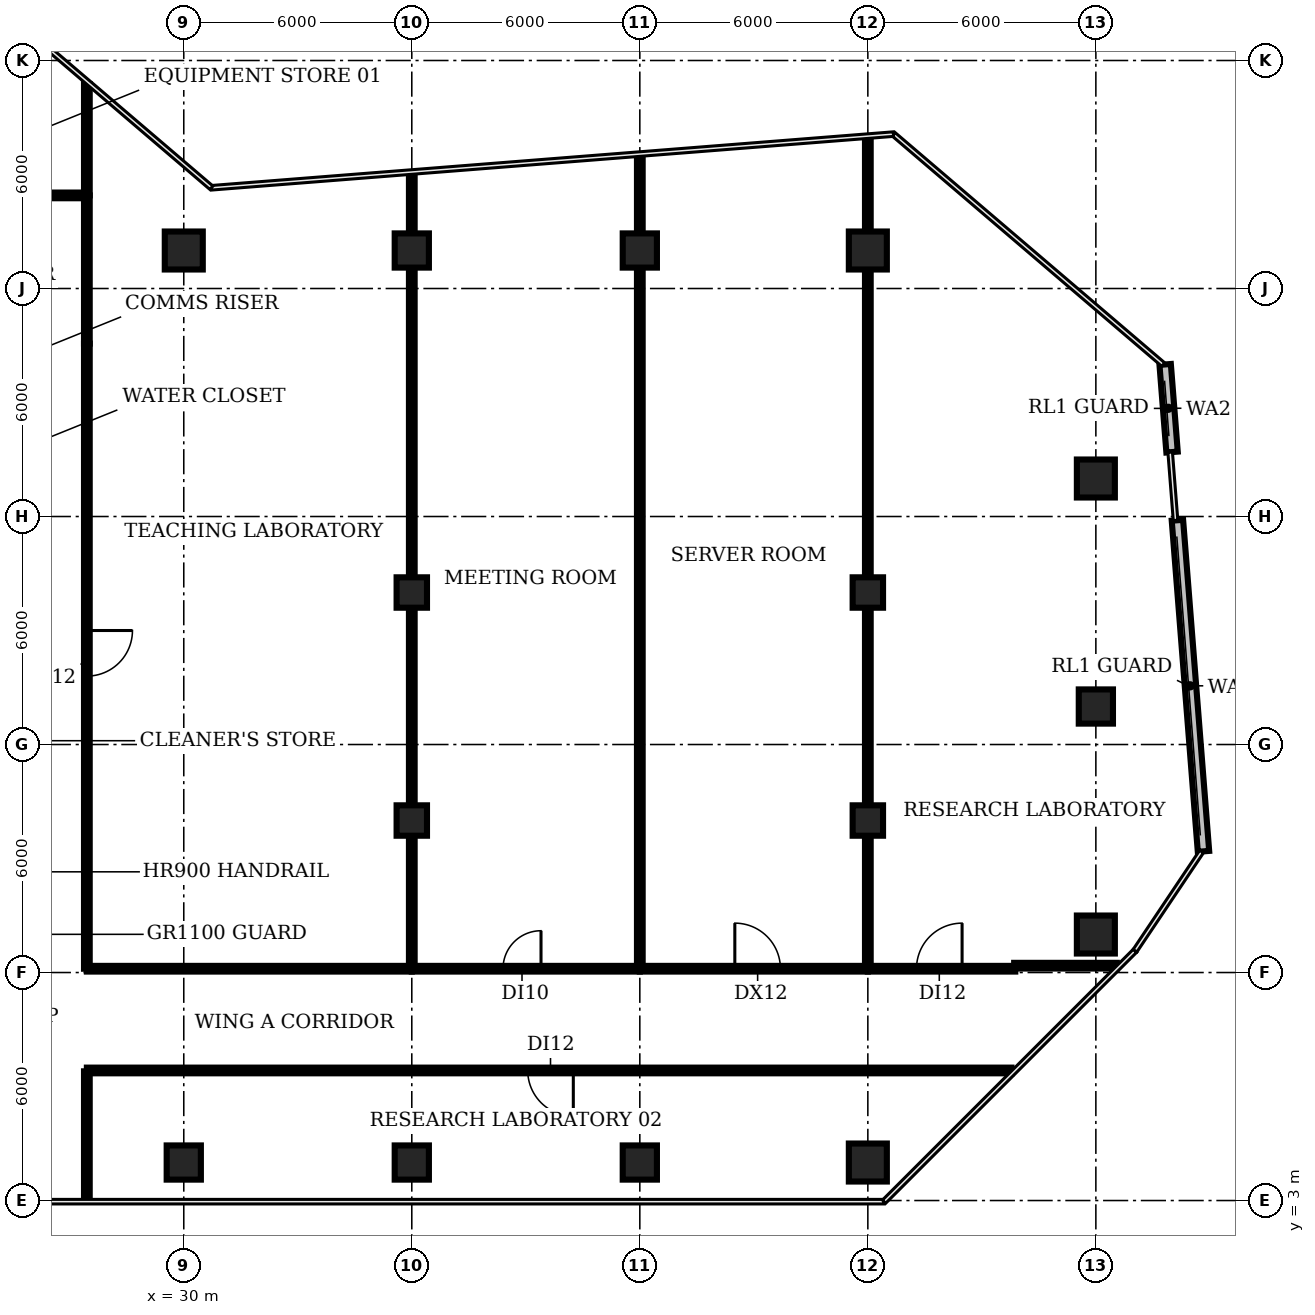
"""IFC4 building model, lengths in metres.
Left out: names, types, materials, properties, quantities, classifications, styles, units other than length and angle.
Written with IfcOpenShell. Run it as: python <this file> out.ifc"""

import sys

from ifc_helpers import new_model, si_unit, direction, frame, frame_2d, origin, origin_2d, place, context, subcontext, project, spatial, rectangle, circle, extrude, element, fill, save


model = new_model("IFC4")
c1 = context("Model", 3, precision=1e-05, world=origin(), true_north=direction((0.0, 1.0)))
c2 = subcontext(c1, "Body", "Model", "MODEL_VIEW")
j1 = project(units=[si_unit("LENGTHUNIT", "METRE"), si_unit("PLANEANGLEUNIT", "RADIAN")], contexts=[c1])
p1 = place(None, origin())
s1 = spatial("IfcSite", under=j1, at=p1, CompositionType="ELEMENT")
p2 = place(p1, origin())
s2 = spatial("IfcBuilding", under=s1, at=p2, CompositionType="ELEMENT")
p3 = place(p2, frame((0.0, 0.0, 92.0)))
s3 = spatial("IfcBuildingStorey", under=s2, at=p3, CompositionType="ELEMENT", Elevation=92.0)
p4 = place(p3, frame((30.0, 4.0, 0.0), z_axis=(0.0, 0.0, 1.0), x_axis=(1.0, 0.0, 0.0)))
e1 = element("IfcColumn", 1, at=p4, inside=s3, PredefinedType="COLUMN", context=c2, shape_type="SweptSolid", body=[
    extrude(rectangle(XDim=0.9, YDim=0.9, at=origin_2d()), origin(), (0.0, 0.0, 1.0), 3.85),
])
p5 = place(p3, frame((30.0, 28.0, 0.0), z_axis=(0.0, 0.0, 1.0), x_axis=(1.0, 0.0, 0.0)))
e2 = element("IfcColumn", 2, at=p5, inside=s3, PredefinedType="COLUMN", context=c2, shape_type="SweptSolid", body=[
    extrude(circle(Radius=0.5, at=origin_2d()), origin(), (0.0, 0.0, 1.0), 3.85),
])
p6 = place(p3, frame((36.0, 4.0, 0.0), z_axis=(0.0, 0.0, 1.0), x_axis=(1.0, 0.0, 0.0)))
e3 = element("IfcColumn", 3, at=p6, inside=s3, PredefinedType="COLUMN", context=c2, shape_type="SweptSolid", body=[
    extrude(rectangle(XDim=0.9, YDim=0.9, at=origin_2d()), origin(), (0.0, 0.0, 1.0), 3.85),
])
for number, where, z_axis, x_axis in (
    (4, (36.0, 13.0, 0.0), (0.0, 0.0, 1.0), (1.0, 0.0, 0.0)),
    (5, (36.0, 19.0, 0.0), (0.0, 0.0, 1.0), (1.0, 0.0, 0.0)),
):
    element("IfcColumn", number, at=place(p3, frame(where, z_axis=z_axis, x_axis=x_axis)), inside=s3, PredefinedType="COLUMN", context=c2, shape_type="SweptSolid", body=[
        extrude(rectangle(XDim=0.8, YDim=0.8, at=origin_2d()), origin(), (0.0, 0.0, 1.0), 3.85),
    ])
for number, where, z_axis, x_axis in (
    (6, (36.0, 28.0, 0.0), (0.0, 0.0, 1.0), (1.0, 0.0, 0.0)),
    (7, (42.0, 4.0, 0.0), (0.0, 0.0, 1.0), (1.0, 0.0, 0.0)),
    (8, (42.0, 28.0, 0.0), (0.0, 0.0, 1.0), (1.0, 0.0, 0.0)),
):
    element("IfcColumn", number, at=place(p3, frame(where, z_axis=z_axis, x_axis=x_axis)), inside=s3, PredefinedType="COLUMN", context=c2, shape_type="SweptSolid", body=[
        extrude(rectangle(XDim=0.9, YDim=0.9, at=origin_2d()), origin(), (0.0, 0.0, 1.0), 3.85),
    ])
p7 = place(p3, frame((48.0, 4.0, 0.0), z_axis=(0.0, 0.0, 1.0), x_axis=(1.0, 0.0, 0.0)))
e9 = element("IfcColumn", 9, at=p7, inside=s3, PredefinedType="COLUMN", context=c2, shape_type="SweptSolid", body=[
    extrude(circle(Radius=0.5, at=origin_2d()), origin(), (0.0, 0.0, 1.0), 3.85),
])
for number, where, z_axis, x_axis in (
    (10, (48.0, 13.0, 0.0), (0.0, 0.0, 1.0), (1.0, 0.0, 0.0)),
    (11, (48.0, 19.0, 0.0), (0.0, 0.0, 1.0), (1.0, 0.0, 0.0)),
):
    element("IfcColumn", number, at=place(p3, frame(where, z_axis=z_axis, x_axis=x_axis)), inside=s3, PredefinedType="COLUMN", context=c2, shape_type="SweptSolid", body=[
        extrude(rectangle(XDim=0.8, YDim=0.8, at=origin_2d()), origin(), (0.0, 0.0, 1.0), 3.85),
    ])
for number, where, z_axis, x_axis in (
    (12, (48.0, 28.0, 0.0), (0.0, 0.0, 1.0), (1.0, 0.0, 0.0)),
    (13, (54.0, 10.0, 0.0), (0.0, 0.0, 1.0), (1.0, 0.0, 0.0)),
):
    element("IfcColumn", number, at=place(p3, frame(where, z_axis=z_axis, x_axis=x_axis)), inside=s3, PredefinedType="COLUMN", context=c2, shape_type="SweptSolid", body=[
        extrude(circle(Radius=0.5, at=origin_2d()), origin(), (0.0, 0.0, 1.0), 3.85),
    ])
p8 = place(p3, frame((54.0, 16.0, 0.0), z_axis=(0.0, 0.0, 1.0), x_axis=(1.0, 0.0, 0.0)))
e14 = element("IfcColumn", 14, at=p8, inside=s3, PredefinedType="COLUMN", context=c2, shape_type="SweptSolid", body=[
    extrude(rectangle(XDim=0.9, YDim=0.9, at=origin_2d()), origin(), (0.0, 0.0, 1.0), 3.85),
])
p9 = place(p3, frame((54.0, 22.0, 0.0), z_axis=(0.0, 0.0, 1.0), x_axis=(1.0, 0.0, 0.0)))
e15 = element("IfcColumn", 15, at=p9, inside=s3, PredefinedType="COLUMN", context=c2, shape_type="SweptSolid", body=[
    extrude(circle(Radius=0.5, at=origin_2d()), origin(), (0.0, 0.0, 1.0), 3.85),
])
p10 = place(p3, frame((56.832, 12.188, 0.0), z_axis=(0.0, 0.0, 1.0), x_axis=(-0.078465058483, 0.996916864436, 0.0)))
e16 = element("IfcWall", 16, at=p10, inside=s3, PredefinedType="SOLIDWALL", context=c2, shape_type="SweptSolid", body=[
    extrude(rectangle(XDim=8.74, YDim=0.3, at=frame_2d((4.37, 0.0))), origin(), (0.0, 0.0, 1.0), 3.85),
])
p11 = place(p3, frame((56.005, 22.696, 0.0), z_axis=(0.0, 0.0, 1.0), x_axis=(-0.078415427879, 0.996920769505, 0.0)))
e17 = element("IfcWall", 17, at=p11, inside=s3, PredefinedType="SOLIDWALL", context=c2, shape_type="SweptSolid", body=[
    extrude(rectangle(XDim=2.313, YDim=0.3, at=frame_2d((1.157, 0.0))), origin(), (0.0, 0.0, 1.0), 3.85),
])
p12 = place(p3, frame((23.85, 29.45, 0.0), z_axis=(0.0, 0.0, 1.0), x_axis=(1.0, 0.0, 0.0)))
e18 = element("IfcWall", 18, at=p12, inside=s3, PredefinedType="PARTITIONING", context=c2, shape_type="SweptSolid", body=[
    extrude(rectangle(XDim=3.6, YDim=0.15, at=frame_2d((1.8, 0.0))), origin(), (0.0, 0.0, 1.0), 2.83),
])
p13 = place(p12, frame((1.3, 0.0, 0.0)))
e19 = element("IfcOpeningElement", 19, at=p13, cuts=e18, PredefinedType="OPENING", context=c2, shape_type="SweptSolid", body=[
    extrude(rectangle(XDim=0.9, YDim=2.1, at=frame_2d((0.45, 1.05))), frame((0.0, 0.085, 0.0), z_axis=(0.0, -1.0, 0.0), x_axis=(1.0, 0.0, 0.0)), (0.0, 0.0, 1.0), 0.17),
])
p14 = place(p3, frame((27.45, 3.02, 0.0), z_axis=(0.0, 0.0, 1.0), x_axis=(0.0, 1.0, 0.0)))
e20 = element("IfcWall", 20, at=p14, inside=s3, PredefinedType="PARTITIONING", context=c2, shape_type="SweptSolid", body=[
    extrude(rectangle(XDim=3.38, YDim=0.15, at=frame_2d((1.69, 0.0))), origin(), (0.0, 0.0, 1.0), 2.83),
])
p15 = place(p3, frame((27.45, 9.1, 0.0), z_axis=(0.0, 0.0, 1.0), x_axis=(1.0, 0.0, 0.0)))
e21 = element("IfcWall", 21, at=p15, inside=s3, PredefinedType="PARTITIONING", context=c2, shape_type="SweptSolid", body=[
    extrude(rectangle(XDim=8.55, YDim=0.15, at=frame_2d((4.275, 0.0))), origin(), (0.0, 0.0, 1.0), 2.83),
])
p16 = place(p3, frame((27.45, 25.55, 0.0), z_axis=(0.0, 0.0, 1.0), x_axis=(0.0, -1.0, 0.0)))
e22 = element("IfcWall", 22, at=p16, inside=s3, PredefinedType="PARTITIONING", context=c2, shape_type="SweptSolid", body=[
    extrude(rectangle(XDim=16.45, YDim=0.15, at=frame_2d((8.225, 0.0))), origin(), (0.0, 0.0, 1.0), 2.83),
])
p17 = place(p16, frame((7.55, 0.0, 0.0)))
e23 = element("IfcOpeningElement", 23, at=p17, cuts=e22, PredefinedType="OPENING", context=c2, shape_type="SweptSolid", body=[
    extrude(rectangle(XDim=1.2, YDim=2.1, at=frame_2d((0.6, 1.05))), frame((0.0, 0.085, 0.0), z_axis=(0.0, -1.0, 0.0), x_axis=(1.0, 0.0, 0.0)), (0.0, 0.0, 1.0), 0.17),
])
p18 = place(p3, frame((27.45, 25.55, 0.0), z_axis=(0.0, 0.0, 1.0), x_axis=(0.0, 1.0, 0.0)))
e24 = element("IfcWall", 24, at=p18, inside=s3, PredefinedType="PARTITIONING", context=c2, shape_type="SweptSolid", body=[
    extrude(rectangle(XDim=3.9, YDim=0.15, at=frame_2d((1.95, 0.0))), origin(), (0.0, 0.0, 1.0), 2.83),
])
p19 = place(p3, frame((27.45, 29.45, 0.0), z_axis=(0.0, 0.0, 1.0), x_axis=(0.0, 1.0, 0.0)))
e25 = element("IfcWall", 25, at=p19, inside=s3, PredefinedType="PARTITIONING", context=c2, shape_type="SweptSolid", body=[
    extrude(rectangle(XDim=2.93, YDim=0.15, at=frame_2d((1.465, 0.0))), origin(), (0.0, 0.0, 1.0), 2.83),
])
p20 = place(p3, frame((36.0, 9.1, 0.0), z_axis=(0.0, 0.0, 1.0), x_axis=(0.0, 1.0, 0.0)))
e26 = element("IfcWall", 26, at=p20, inside=s3, PredefinedType="PARTITIONING", context=c2, shape_type="SweptSolid", body=[
    extrude(rectangle(XDim=20.92, YDim=0.15, at=frame_2d((10.46, 0.0))), origin(), (0.0, 0.0, 1.0), 2.83),
])
p21 = place(p3, frame((36.0, 9.1, 0.0), z_axis=(0.0, 0.0, 1.0), x_axis=(1.0, 0.0, 0.0)))
e27 = element("IfcWall", 27, at=p21, inside=s3, PredefinedType="PARTITIONING", context=c2, shape_type="SweptSolid", body=[
    extrude(rectangle(XDim=6.0, YDim=0.15, at=frame_2d((3.0, 0.0))), origin(), (0.0, 0.0, 1.0), 2.83),
])
p22 = place(p21, frame((2.4, 0.0, 0.0)))
e28 = element("IfcOpeningElement", 28, at=p22, cuts=e27, PredefinedType="OPENING", context=c2, shape_type="SweptSolid", body=[
    extrude(rectangle(XDim=1.0, YDim=2.1, at=frame_2d((0.5, 1.05))), frame((0.0, 0.085, 0.0), z_axis=(0.0, -1.0, 0.0), x_axis=(1.0, 0.0, 0.0)), (0.0, 0.0, 1.0), 0.17),
])
p23 = place(p3, frame((42.0, 9.1, 0.0), z_axis=(0.0, 0.0, 1.0), x_axis=(0.0, 1.0, 0.0)))
e29 = element("IfcWall", 29, at=p23, inside=s3, PredefinedType="PARTITIONING", context=c2, shape_type="SweptSolid", body=[
    extrude(rectangle(XDim=21.39, YDim=0.15, at=frame_2d((10.695, 0.0))), origin(), (0.0, 0.0, 1.0), 2.83),
])
p24 = place(p3, frame((42.0, 9.1, 0.0), z_axis=(0.0, 0.0, 1.0), x_axis=(1.0, 0.0, 0.0)))
e30 = element("IfcWall", 30, at=p24, inside=s3, PredefinedType="PARTITIONING", context=c2, shape_type="SweptSolid", body=[
    extrude(rectangle(XDim=6.0, YDim=0.15, at=frame_2d((3.0, 0.0))), origin(), (0.0, 0.0, 1.0), 2.83),
])
p25 = place(p24, frame((2.5, 0.0, 0.0)))
e31 = element("IfcOpeningElement", 31, at=p25, cuts=e30, PredefinedType="OPENING", context=c2, shape_type="SweptSolid", body=[
    extrude(rectangle(XDim=1.2, YDim=2.1, at=frame_2d((0.6, 1.05))), frame((0.0, 0.085, 0.0), z_axis=(0.0, -1.0, 0.0), x_axis=(1.0, 0.0, 0.0)), (0.0, 0.0, 1.0), 0.17),
])
p26 = place(p3, frame((48.0, 9.1, 0.0), z_axis=(0.0, 0.0, 1.0), x_axis=(0.0, 1.0, 0.0)))
e32 = element("IfcWall", 32, at=p26, inside=s3, PredefinedType="PARTITIONING", context=c2, shape_type="SweptSolid", body=[
    extrude(rectangle(XDim=21.86, YDim=0.15, at=frame_2d((10.93, 0.0))), origin(), (0.0, 0.0, 1.0), 2.83),
])
p27 = place(p3, frame((48.0, 9.1, 0.0), z_axis=(0.0, 0.0, 1.0), x_axis=(1.0, 0.0, 0.0)))
e33 = element("IfcWall", 33, at=p27, inside=s3, PredefinedType="PARTITIONING", context=c2, shape_type="SweptSolid", body=[
    extrude(rectangle(XDim=3.88, YDim=0.15, at=frame_2d((1.94, 0.0))), origin(), (0.0, 0.0, 1.0), 2.83),
])
p28 = place(p27, frame((1.28, 0.0, 0.0)))
e34 = element("IfcOpeningElement", 34, at=p28, cuts=e33, PredefinedType="OPENING", context=c2, shape_type="SweptSolid", body=[
    extrude(rectangle(XDim=1.2, YDim=2.1, at=frame_2d((0.6, 1.05))), frame((0.0, 0.085, 0.0), z_axis=(0.0, -1.0, 0.0), x_axis=(1.0, 0.0, 0.0)), (0.0, 0.0, 1.0), 0.17),
])
p29 = place(p3, frame((51.78, 6.423, 0.0), z_axis=(0.0, 0.0, 1.0), x_axis=(-1.0, 0.0, 0.0)))
e35 = element("IfcWall", 35, at=p29, inside=s3, PredefinedType="PARTITIONING", context=c2, shape_type="SweptSolid", body=[
    extrude(rectangle(XDim=24.33, YDim=0.15, at=frame_2d((12.165, 0.0))), origin(), (0.0, 0.0, 1.0), 2.83),
])
p30 = place(p29, frame((11.53, 0.0, 0.0)))
e36 = element("IfcOpeningElement", 36, at=p30, cuts=e35, PredefinedType="OPENING", context=c2, shape_type="SweptSolid", body=[
    extrude(rectangle(XDim=1.2, YDim=2.1, at=frame_2d((0.6, 1.05))), frame((0.0, 0.085, 0.0), z_axis=(0.0, -1.0, 0.0), x_axis=(1.0, 0.0, 0.0)), (0.0, 0.0, 1.0), 0.17),
])
p31 = place(p3, frame((51.85, 9.18, 0.0), z_axis=(0.0, 0.0, 1.0), x_axis=(1.0, 0.0, 0.0)))
e37 = element("IfcWall", 37, at=p31, inside=s3, PredefinedType="PARTITIONING", context=c2, shape_type="SweptSolid", body=[
    extrude(rectangle(XDim=2.702, YDim=0.15, at=frame_2d((1.351, 0.0))), origin(), (0.0, 0.0, 1.0), 2.83),
])
p32 = place(p17, origin())
e38 = element("IfcDoor", 38, at=p32, inside=s3, OperationType="SINGLE_SWING_LEFT", PredefinedType="DOOR", context=c2, shape_type="SweptSolid", body=[
    extrude(rectangle(XDim=1.2, YDim=2.1, at=frame_2d((0.6, 1.05))), frame((0.0, 0.025, 0.0), z_axis=(0.0, -1.0, 0.0), x_axis=(1.0, 0.0, 0.0)), (0.0, 0.0, 1.0), 0.05),
])
fill(e23, e38)
p33 = place(p22, origin())
e39 = element("IfcDoor", 39, at=p33, inside=s3, OperationType="SINGLE_SWING_RIGHT", PredefinedType="DOOR", context=c2, shape_type="SweptSolid", body=[
    extrude(rectangle(XDim=1.0, YDim=2.1, at=frame_2d((0.5, 1.05))), frame((0.0, 0.025, 0.0), z_axis=(0.0, -1.0, 0.0), x_axis=(1.0, 0.0, 0.0)), (0.0, 0.0, 1.0), 0.05),
])
fill(e28, e39)
p34 = place(p25, origin())
e40 = element("IfcDoor", 40, at=p34, inside=s3, OperationType="SINGLE_SWING_LEFT", PredefinedType="DOOR", context=c2, shape_type="SweptSolid", body=[
    extrude(rectangle(XDim=1.2, YDim=2.1, at=frame_2d((0.6, 1.05))), frame((0.0, 0.025, 0.0), z_axis=(0.0, -1.0, 0.0), x_axis=(1.0, 0.0, 0.0)), (0.0, 0.0, 1.0), 0.05),
])
fill(e31, e40)
p35 = place(p28, origin())
e41 = element("IfcDoor", 41, at=p35, inside=s3, OperationType="SINGLE_SWING_RIGHT", PredefinedType="DOOR", context=c2, shape_type="SweptSolid", body=[
    extrude(rectangle(XDim=1.2, YDim=2.1, at=frame_2d((0.6, 1.05))), frame((0.0, 0.025, 0.0), z_axis=(0.0, -1.0, 0.0), x_axis=(1.0, 0.0, 0.0)), (0.0, 0.0, 1.0), 0.05),
])
fill(e34, e41)
p36 = place(p30, origin())
e42 = element("IfcDoor", 42, at=p36, inside=s3, OperationType="SINGLE_SWING_LEFT", PredefinedType="DOOR", context=c2, shape_type="SweptSolid", body=[
    extrude(rectangle(XDim=1.2, YDim=2.1, at=frame_2d((0.6, 1.05))), frame((0.0, 0.025, 0.0), z_axis=(0.0, -1.0, 0.0), x_axis=(1.0, 0.0, 0.0)), (0.0, 0.0, 1.0), 0.05),
])
fill(e36, e42)
save(model, sys.argv[1])
